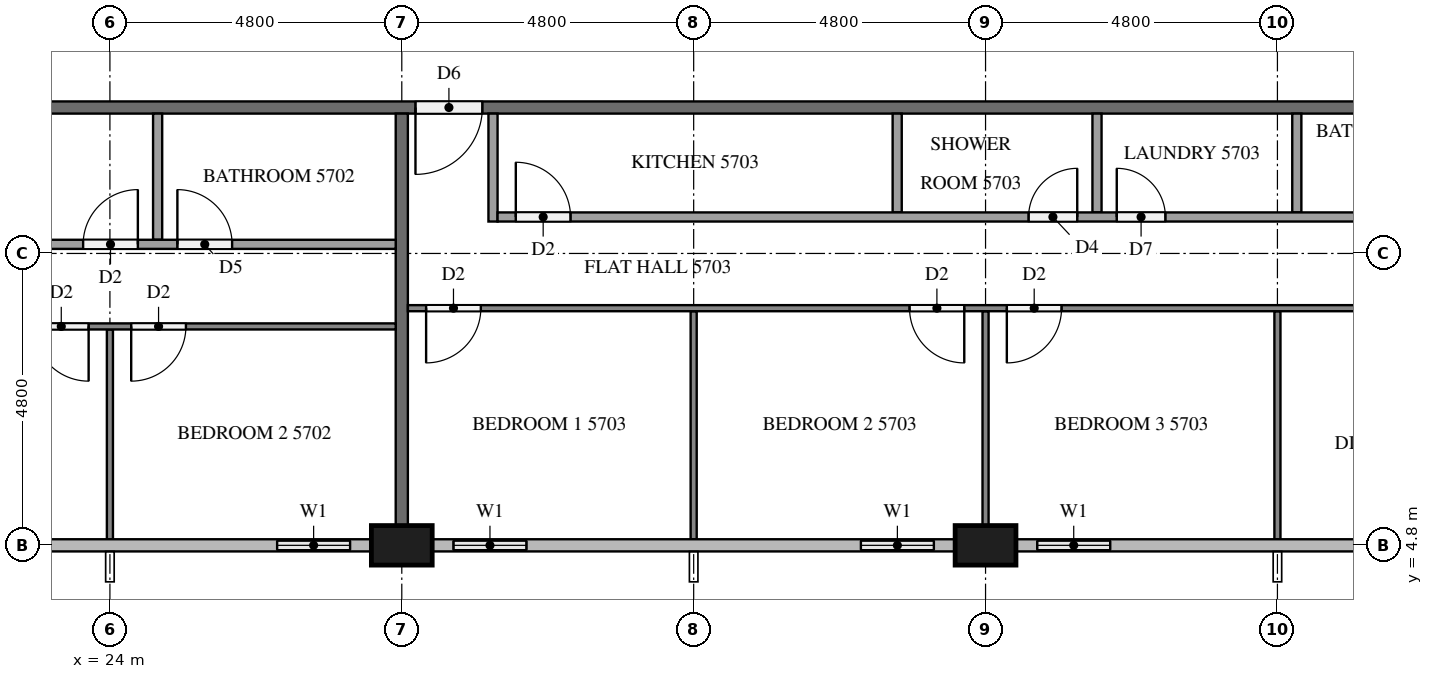
"""IFC4 building model, lengths in metres.
Left out: names, types, materials, properties, quantities, classifications, styles, units other than length and angle.
Written with IfcOpenShell. Run it as: python <this file> out.ifc"""

import sys

from ifc_helpers import new_model, si_unit, direction, frame, frame_2d, origin, origin_2d, place, context, subcontext, project, spatial, rectangle, extrude, element, fill, save


model = new_model("IFC4")
c1 = context("Model", 3, precision=1e-05, world=origin(), true_north=direction((0.0, 1.0)))
c2 = subcontext(c1, "Body", "Model", "MODEL_VIEW")
j1 = project(units=[si_unit("LENGTHUNIT", "METRE"), si_unit("PLANEANGLEUNIT", "RADIAN")], contexts=[c1])
p1 = place(None, origin())
s1 = spatial("IfcSite", under=j1, at=p1, CompositionType="ELEMENT")
p2 = place(p1, origin())
s2 = spatial("IfcBuilding", under=s1, at=p2, CompositionType="ELEMENT")
p3 = place(p2, frame((0.0, 0.0, 219.3)))
s3 = spatial("IfcBuildingStorey", under=s2, at=p3, CompositionType="ELEMENT", Elevation=219.3)
for number, where, z_axis, x_axis in (
    (1, (28.8, 4.8, 0.0), (0.0, 0.0, 1.0), (1.0, 0.0, 0.0)),
    (2, (38.4, 4.8, 0.0), (0.0, 0.0, 1.0), (1.0, 0.0, 0.0)),
):
    element("IfcColumn", number, at=place(p3, frame(where, z_axis=z_axis, x_axis=x_axis)), inside=s3, PredefinedType="COLUMN", context=c2, shape_type="SweptSolid", body=[
        extrude(rectangle(XDim=1.0, YDim=0.65, at=origin_2d()), origin(), (0.0, 0.0, 1.0), 3.2),
    ])
p4 = place(p3, frame((26.4, 4.8, 0.0), z_axis=(0.0, 0.0, 1.0), x_axis=(1.0, 0.0, 0.0)))
e3 = element("IfcWall", 3, at=p4, inside=s3, PredefinedType="SOLIDWALL", context=c2, shape_type="SweptSolid", body=[
    extrude(rectangle(XDim=1.9, YDim=0.15, at=frame_2d((0.95, 0.0))), origin(), (0.0, 0.0, 1.0), 3.2),
])
p5 = place(p4, frame((0.35, 0.0, 0.9)))
e4 = element("IfcOpeningElement", 4, at=p5, cuts=e3, PredefinedType="OPENING", context=c2, shape_type="SweptSolid", body=[
    extrude(rectangle(XDim=1.2, YDim=1.4, at=frame_2d((0.6, 0.7))), frame((0.0, 0.085, 0.0), z_axis=(0.0, -1.0, 0.0), x_axis=(1.0, 0.0, 0.0)), (0.0, 0.0, 1.0), 0.17),
])
p6 = place(p3, frame((29.3, 4.8, 0.0), z_axis=(0.0, 0.0, 1.0), x_axis=(1.0, 0.0, 0.0)))
e5 = element("IfcWall", 5, at=p6, inside=s3, PredefinedType="SOLIDWALL", context=c2, shape_type="SweptSolid", body=[
    extrude(rectangle(XDim=1.9, YDim=0.15, at=frame_2d((0.95, 0.0))), origin(), (0.0, 0.0, 1.0), 3.2),
])
p7 = place(p6, frame((0.35, 0.0, 0.9)))
e6 = element("IfcOpeningElement", 6, at=p7, cuts=e5, PredefinedType="OPENING", context=c2, shape_type="SweptSolid", body=[
    extrude(rectangle(XDim=1.2, YDim=1.4, at=frame_2d((0.6, 0.7))), frame((0.0, 0.085, 0.0), z_axis=(0.0, -1.0, 0.0), x_axis=(1.0, 0.0, 0.0)), (0.0, 0.0, 1.0), 0.17),
])
p8 = place(p3, frame((36.0, 4.8, 0.0), z_axis=(0.0, 0.0, 1.0), x_axis=(1.0, 0.0, 0.0)))
e7 = element("IfcWall", 7, at=p8, inside=s3, PredefinedType="SOLIDWALL", context=c2, shape_type="SweptSolid", body=[
    extrude(rectangle(XDim=1.9, YDim=0.15, at=frame_2d((0.95, 0.0))), origin(), (0.0, 0.0, 1.0), 3.2),
])
p9 = place(p8, frame((0.35, 0.0, 0.9)))
e8 = element("IfcOpeningElement", 8, at=p9, cuts=e7, PredefinedType="OPENING", context=c2, shape_type="SweptSolid", body=[
    extrude(rectangle(XDim=1.2, YDim=1.4, at=frame_2d((0.6, 0.7))), frame((0.0, 0.085, 0.0), z_axis=(0.0, -1.0, 0.0), x_axis=(1.0, 0.0, 0.0)), (0.0, 0.0, 1.0), 0.17),
])
p10 = place(p3, frame((38.9, 4.8, 0.0), z_axis=(0.0, 0.0, 1.0), x_axis=(1.0, 0.0, 0.0)))
e9 = element("IfcWall", 9, at=p10, inside=s3, PredefinedType="SOLIDWALL", context=c2, shape_type="SweptSolid", body=[
    extrude(rectangle(XDim=1.9, YDim=0.15, at=frame_2d((0.95, 0.0))), origin(), (0.0, 0.0, 1.0), 3.2),
])
p11 = place(p10, frame((0.35, 0.0, 0.9)))
e10 = element("IfcOpeningElement", 10, at=p11, cuts=e9, PredefinedType="OPENING", context=c2, shape_type="SweptSolid", body=[
    extrude(rectangle(XDim=1.2, YDim=1.4, at=frame_2d((0.6, 0.7))), frame((0.0, 0.085, 0.0), z_axis=(0.0, -1.0, 0.0), x_axis=(1.0, 0.0, 0.0)), (0.0, 0.0, 1.0), 0.17),
])
p12 = place(p3, frame((50.5, 12.0, 0.0), z_axis=(0.0, 0.0, 1.0), x_axis=(-1.0, 0.0, 0.0)))
e11 = element("IfcWall", 11, at=p12, inside=s3, PredefinedType="PARTITIONING", context=c2, shape_type="SweptSolid", body=[
    extrude(rectangle(XDim=38.6, YDim=0.2, at=frame_2d((19.3, 0.0))), origin(), (0.0, 0.0, 1.0), 3.2),
])
p13 = place(p12, frame((36.375, 0.0, 0.0)))
e12 = element("IfcOpeningElement", 12, at=p13, cuts=e11, PredefinedType="OPENING", context=c2, shape_type="SweptSolid", body=[
    extrude(rectangle(XDim=1.0, YDim=2.1, at=frame_2d((0.5, 1.05))), frame((0.0, 0.11, 0.0), z_axis=(0.0, -1.0, 0.0), x_axis=(1.0, 0.0, 0.0)), (0.0, 0.0, 1.0), 0.22),
])
p14 = place(p12, frame((34.825, 0.0, 0.0)))
e13 = element("IfcOpeningElement", 13, at=p14, cuts=e11, PredefinedType="OPENING", context=c2, shape_type="SweptSolid", body=[
    extrude(rectangle(XDim=1.0, YDim=2.1, at=frame_2d((0.5, 1.05))), frame((0.0, 0.11, 0.0), z_axis=(0.0, -1.0, 0.0), x_axis=(1.0, 0.0, 0.0)), (0.0, 0.0, 1.0), 0.22),
])
p15 = place(p12, frame((20.375, 0.0, 0.0)))
e14 = element("IfcOpeningElement", 14, at=p15, cuts=e11, PredefinedType="OPENING", context=c2, shape_type="SweptSolid", body=[
    extrude(rectangle(XDim=1.1, YDim=2.1, at=frame_2d((0.55, 1.05))), frame((0.0, 0.11, 0.0), z_axis=(0.0, -1.0, 0.0), x_axis=(1.0, 0.0, 0.0)), (0.0, 0.0, 1.0), 0.22),
])
p16 = place(p12, frame((1.225, 0.0, 0.0)))
e15 = element("IfcOpeningElement", 15, at=p16, cuts=e11, PredefinedType="OPENING", context=c2, shape_type="SweptSolid", body=[
    extrude(rectangle(XDim=1.0, YDim=2.1, at=frame_2d((0.5, 1.05))), frame((0.0, 0.11, 0.0), z_axis=(0.0, -1.0, 0.0), x_axis=(1.0, 0.0, 0.0)), (0.0, 0.0, 1.0), 0.22),
])
p17 = place(p3, frame((28.8, 11.9, 0.0), z_axis=(0.0, 0.0, 1.0), x_axis=(0.0, -1.0, 0.0)))
e16 = element("IfcWall", 16, at=p17, inside=s3, PredefinedType="PARTITIONING", context=c2, shape_type="SweptSolid", body=[
    extrude(rectangle(XDim=6.775, YDim=0.2, at=frame_2d((3.387, 0.0))), origin(), (0.0, 0.0, 1.0), 3.2),
])
p18 = place(p3, frame((24.0, 8.35, 0.0), z_axis=(0.0, 0.0, 1.0), x_axis=(0.0, -1.0, 0.0)))
e17 = element("IfcWall", 17, at=p18, inside=s3, PredefinedType="PARTITIONING", context=c2, shape_type="SweptSolid", body=[
    extrude(rectangle(XDim=3.45, YDim=0.1, at=frame_2d((1.725, 0.0))), origin(), (0.0, 0.0, 1.0), 3.2),
])
p19 = place(p3, frame((28.7, 8.4, 0.0), z_axis=(0.0, 0.0, 1.0), x_axis=(-1.0, 0.0, 0.0)))
e18 = element("IfcWall", 18, at=p19, inside=s3, PredefinedType="PARTITIONING", context=c2, shape_type="SweptSolid", body=[
    extrude(rectangle(XDim=14.2, YDim=0.1, at=frame_2d((7.1, 0.0))), origin(), (0.0, 0.0, 1.0), 3.2),
])
p20 = place(p19, frame((12.9, 0.0, 0.0)))
e19 = element("IfcOpeningElement", 19, at=p20, cuts=e18, PredefinedType="OPENING", context=c2, shape_type="SweptSolid", body=[
    extrude(rectangle(XDim=1.0, YDim=2.1, at=frame_2d((0.5, 1.05))), frame((0.0, 0.06, 0.0), z_axis=(0.0, -1.0, 0.0), x_axis=(1.0, 0.0, 0.0)), (0.0, 0.0, 1.0), 0.12),
])
p21 = place(p19, frame((5.05, 0.0, 0.0)))
e20 = element("IfcOpeningElement", 20, at=p21, cuts=e18, PredefinedType="OPENING", context=c2, shape_type="SweptSolid", body=[
    extrude(rectangle(XDim=0.9, YDim=2.1, at=frame_2d((0.45, 1.05))), frame((0.0, 0.06, 0.0), z_axis=(0.0, -1.0, 0.0), x_axis=(1.0, 0.0, 0.0)), (0.0, 0.0, 1.0), 0.12),
])
p22 = place(p19, frame((3.45, 0.0, 0.0)))
e21 = element("IfcOpeningElement", 21, at=p22, cuts=e18, PredefinedType="OPENING", context=c2, shape_type="SweptSolid", body=[
    extrude(rectangle(XDim=0.9, YDim=2.1, at=frame_2d((0.45, 1.05))), frame((0.0, 0.06, 0.0), z_axis=(0.0, -1.0, 0.0), x_axis=(1.0, 0.0, 0.0)), (0.0, 0.0, 1.0), 0.12),
])
p23 = place(p3, frame((24.785, 11.9, 0.0), z_axis=(0.0, 0.0, 1.0), x_axis=(0.0, -1.0, 0.0)))
e22 = element("IfcWall", 22, at=p23, inside=s3, PredefinedType="PARTITIONING", context=c2, shape_type="SweptSolid", body=[
    extrude(rectangle(XDim=2.075, YDim=0.15, at=frame_2d((1.038, 0.0))), origin(), (0.0, 0.0, 1.0), 3.2),
])
p24 = place(p3, frame((15.975, 9.75, 0.0), z_axis=(0.0, 0.0, 1.0), x_axis=(1.0, 0.0, 0.0)))
e23 = element("IfcWall", 23, at=p24, inside=s3, PredefinedType="PARTITIONING", context=c2, shape_type="SweptSolid", body=[
    extrude(rectangle(XDim=12.725, YDim=0.15, at=frame_2d((6.362, 0.0))), origin(), (0.0, 0.0, 1.0), 3.2),
])
p25 = place(p24, frame((0.3, 0.0, 0.0)))
e24 = element("IfcOpeningElement", 24, at=p25, cuts=e23, PredefinedType="OPENING", context=c2, shape_type="SweptSolid", body=[
    extrude(rectangle(XDim=0.8, YDim=2.1, at=frame_2d((0.4, 1.05))), frame((0.0, 0.085, 0.0), z_axis=(0.0, -1.0, 0.0), x_axis=(1.0, 0.0, 0.0)), (0.0, 0.0, 1.0), 0.17),
])
p26 = place(p24, frame((7.585, 0.0, 0.0)))
e25 = element("IfcOpeningElement", 25, at=p26, cuts=e23, PredefinedType="OPENING", context=c2, shape_type="SweptSolid", body=[
    extrude(rectangle(XDim=0.9, YDim=2.1, at=frame_2d((0.45, 1.05))), frame((0.0, 0.085, 0.0), z_axis=(0.0, -1.0, 0.0), x_axis=(1.0, 0.0, 0.0)), (0.0, 0.0, 1.0), 0.17),
])
p27 = place(p24, frame((9.135, 0.0, 0.0)))
e26 = element("IfcOpeningElement", 26, at=p27, cuts=e23, PredefinedType="OPENING", context=c2, shape_type="SweptSolid", body=[
    extrude(rectangle(XDim=0.9, YDim=2.1, at=frame_2d((0.45, 1.05))), frame((0.0, 0.085, 0.0), z_axis=(0.0, -1.0, 0.0), x_axis=(1.0, 0.0, 0.0)), (0.0, 0.0, 1.0), 0.17),
])
p28 = place(p3, frame((33.6, 8.65, 0.0), z_axis=(0.0, 0.0, 1.0), x_axis=(0.0, -1.0, 0.0)))
e27 = element("IfcWall", 27, at=p28, inside=s3, PredefinedType="PARTITIONING", context=c2, shape_type="SweptSolid", body=[
    extrude(rectangle(XDim=3.75, YDim=0.1, at=frame_2d((1.875, 0.0))), origin(), (0.0, 0.0, 1.0), 3.2),
])
p29 = place(p3, frame((38.4, 8.65, 0.0), z_axis=(0.0, 0.0, 1.0), x_axis=(0.0, -1.0, 0.0)))
e28 = element("IfcWall", 28, at=p29, inside=s3, PredefinedType="PARTITIONING", context=c2, shape_type="SweptSolid", body=[
    extrude(rectangle(XDim=3.525, YDim=0.1, at=frame_2d((1.762, 0.0))), origin(), (0.0, 0.0, 1.0), 3.2),
])
p30 = place(p3, frame((43.2, 8.65, 0.0), z_axis=(0.0, 0.0, 1.0), x_axis=(0.0, -1.0, 0.0)))
e29 = element("IfcWall", 29, at=p30, inside=s3, PredefinedType="PARTITIONING", context=c2, shape_type="SweptSolid", body=[
    extrude(rectangle(XDim=3.75, YDim=0.1, at=frame_2d((1.875, 0.0))), origin(), (0.0, 0.0, 1.0), 3.2),
])
p31 = place(p3, frame((47.9, 8.7, 0.0), z_axis=(0.0, 0.0, 1.0), x_axis=(-1.0, 0.0, 0.0)))
e30 = element("IfcWall", 30, at=p31, inside=s3, PredefinedType="PARTITIONING", context=c2, shape_type="SweptSolid", body=[
    extrude(rectangle(XDim=19.0, YDim=0.1, at=frame_2d((9.5, 0.0))), origin(), (0.0, 0.0, 1.0), 3.2),
])
p32 = place(p31, frame((17.8, 0.0, 0.0)))
e31 = element("IfcOpeningElement", 31, at=p32, cuts=e30, PredefinedType="OPENING", context=c2, shape_type="SweptSolid", body=[
    extrude(rectangle(XDim=0.9, YDim=2.1, at=frame_2d((0.45, 1.05))), frame((0.0, 0.06, 0.0), z_axis=(0.0, -1.0, 0.0), x_axis=(1.0, 0.0, 0.0)), (0.0, 0.0, 1.0), 0.12),
])
p33 = place(p31, frame((9.85, 0.0, 0.0)))
e32 = element("IfcOpeningElement", 32, at=p33, cuts=e30, PredefinedType="OPENING", context=c2, shape_type="SweptSolid", body=[
    extrude(rectangle(XDim=0.9, YDim=2.1, at=frame_2d((0.45, 1.05))), frame((0.0, 0.06, 0.0), z_axis=(0.0, -1.0, 0.0), x_axis=(1.0, 0.0, 0.0)), (0.0, 0.0, 1.0), 0.12),
])
p34 = place(p31, frame((8.25, 0.0, 0.0)))
e33 = element("IfcOpeningElement", 33, at=p34, cuts=e30, PredefinedType="OPENING", context=c2, shape_type="SweptSolid", body=[
    extrude(rectangle(XDim=0.9, YDim=2.1, at=frame_2d((0.45, 1.05))), frame((0.0, 0.06, 0.0), z_axis=(0.0, -1.0, 0.0), x_axis=(1.0, 0.0, 0.0)), (0.0, 0.0, 1.0), 0.12),
])
p35 = place(p31, frame((0.3, 0.0, 0.0)))
e34 = element("IfcOpeningElement", 34, at=p35, cuts=e30, PredefinedType="OPENING", context=c2, shape_type="SweptSolid", body=[
    extrude(rectangle(XDim=1.0, YDim=2.1, at=frame_2d((0.5, 1.05))), frame((0.0, 0.06, 0.0), z_axis=(0.0, -1.0, 0.0), x_axis=(1.0, 0.0, 0.0)), (0.0, 0.0, 1.0), 0.12),
])
for number, where, z_axis, x_axis in (
    (35, (36.947, 11.9, 0.0), (0.0, 0.0, 1.0), (0.0, -1.0, 0.0)),
    (36, (40.233, 11.9, 0.0), (0.0, 0.0, 1.0), (0.0, -1.0, 0.0)),
    (37, (43.519, 11.9, 0.0), (0.0, 0.0, 1.0), (0.0, -1.0, 0.0)),
):
    element("IfcWall", number, at=place(p3, frame(where, z_axis=z_axis, x_axis=x_axis)), inside=s3, PredefinedType="PARTITIONING", context=c2, shape_type="SweptSolid", body=[
        extrude(rectangle(XDim=1.625, YDim=0.15, at=frame_2d((0.812, 0.0))), origin(), (0.0, 0.0, 1.0), 3.2),
    ])
p36 = place(p3, frame((30.3, 11.9, 0.0), z_axis=(0.0, 0.0, 1.0), x_axis=(0.0, -1.0, 0.0)))
e38 = element("IfcWall", 38, at=p36, inside=s3, PredefinedType="PARTITIONING", context=c2, shape_type="SweptSolid", body=[
    extrude(rectangle(XDim=1.775, YDim=0.15, at=frame_2d((0.887, 0.0))), origin(), (0.0, 0.0, 1.0), 3.2),
])
p37 = place(p3, frame((30.375, 10.2, 0.0), z_axis=(0.0, 0.0, 1.0), x_axis=(1.0, 0.0, 0.0)))
e39 = element("IfcWall", 39, at=p37, inside=s3, PredefinedType="PARTITIONING", context=c2, shape_type="SweptSolid", body=[
    extrude(rectangle(XDim=17.525, YDim=0.15, at=frame_2d((8.762, 0.0))), origin(), (0.0, 0.0, 1.0), 3.2),
])
p38 = place(p37, frame((0.3, 0.0, 0.0)))
e40 = element("IfcOpeningElement", 40, at=p38, cuts=e39, PredefinedType="OPENING", context=c2, shape_type="SweptSolid", body=[
    extrude(rectangle(XDim=0.9, YDim=2.1, at=frame_2d((0.45, 1.05))), frame((0.0, 0.085, 0.0), z_axis=(0.0, -1.0, 0.0), x_axis=(1.0, 0.0, 0.0)), (0.0, 0.0, 1.0), 0.17),
])
p39 = place(p37, frame((8.733, 0.0, 0.0)))
e41 = element("IfcOpeningElement", 41, at=p39, cuts=e39, PredefinedType="OPENING", context=c2, shape_type="SweptSolid", body=[
    extrude(rectangle(XDim=0.8, YDim=2.1, at=frame_2d((0.4, 1.05))), frame((0.0, 0.085, 0.0), z_axis=(0.0, -1.0, 0.0), x_axis=(1.0, 0.0, 0.0)), (0.0, 0.0, 1.0), 0.17),
])
p40 = place(p37, frame((10.183, 0.0, 0.0)))
e42 = element("IfcOpeningElement", 42, at=p40, cuts=e39, PredefinedType="OPENING", context=c2, shape_type="SweptSolid", body=[
    extrude(rectangle(XDim=0.8, YDim=2.1, at=frame_2d((0.4, 1.05))), frame((0.0, 0.085, 0.0), z_axis=(0.0, -1.0, 0.0), x_axis=(1.0, 0.0, 0.0)), (0.0, 0.0, 1.0), 0.17),
])
p41 = place(p37, frame((16.275, 0.0, 0.0)))
e43 = element("IfcOpeningElement", 43, at=p41, cuts=e39, PredefinedType="OPENING", context=c2, shape_type="SweptSolid", body=[
    extrude(rectangle(XDim=0.9, YDim=2.1, at=frame_2d((0.45, 1.05))), frame((0.0, 0.085, 0.0), z_axis=(0.0, -1.0, 0.0), x_axis=(1.0, 0.0, 0.0)), (0.0, 0.0, 1.0), 0.17),
])
p42 = place(p5, origin())
e44 = element("IfcWindow", 44, at=p42, inside=s3, PartitioningType="SINGLE_PANEL", PredefinedType="WINDOW", context=c2, shape_type="SweptSolid", body=[
    extrude(rectangle(XDim=1.2, YDim=1.4, at=frame_2d((0.6, 0.7))), frame((0.0, 0.03, 0.0), z_axis=(0.0, -1.0, 0.0), x_axis=(1.0, 0.0, 0.0)), (0.0, 0.0, 1.0), 0.06),
])
fill(e4, e44)
p43 = place(p7, origin())
e45 = element("IfcWindow", 45, at=p43, inside=s3, PartitioningType="SINGLE_PANEL", PredefinedType="WINDOW", context=c2, shape_type="SweptSolid", body=[
    extrude(rectangle(XDim=1.2, YDim=1.4, at=frame_2d((0.6, 0.7))), frame((0.0, 0.03, 0.0), z_axis=(0.0, -1.0, 0.0), x_axis=(1.0, 0.0, 0.0)), (0.0, 0.0, 1.0), 0.06),
])
fill(e6, e45)
p44 = place(p9, origin())
e46 = element("IfcWindow", 46, at=p44, inside=s3, PartitioningType="SINGLE_PANEL", PredefinedType="WINDOW", context=c2, shape_type="SweptSolid", body=[
    extrude(rectangle(XDim=1.2, YDim=1.4, at=frame_2d((0.6, 0.7))), frame((0.0, 0.03, 0.0), z_axis=(0.0, -1.0, 0.0), x_axis=(1.0, 0.0, 0.0)), (0.0, 0.0, 1.0), 0.06),
])
fill(e8, e46)
p45 = place(p11, origin())
e47 = element("IfcWindow", 47, at=p45, inside=s3, PartitioningType="SINGLE_PANEL", PredefinedType="WINDOW", context=c2, shape_type="SweptSolid", body=[
    extrude(rectangle(XDim=1.2, YDim=1.4, at=frame_2d((0.6, 0.7))), frame((0.0, 0.03, 0.0), z_axis=(0.0, -1.0, 0.0), x_axis=(1.0, 0.0, 0.0)), (0.0, 0.0, 1.0), 0.06),
])
fill(e10, e47)
p46 = place(p15, origin())
e48 = element("IfcDoor", 48, at=p46, inside=s3, OperationType="SINGLE_SWING_RIGHT", PredefinedType="DOOR", context=c2, shape_type="SweptSolid", body=[
    extrude(rectangle(XDim=1.1, YDim=2.1, at=frame_2d((0.55, 1.05))), frame((0.0, 0.025, 0.0), z_axis=(0.0, -1.0, 0.0), x_axis=(1.0, 0.0, 0.0)), (0.0, 0.0, 1.0), 0.05),
])
fill(e14, e48)
p47 = place(p21, origin())
e49 = element("IfcDoor", 49, at=p47, inside=s3, OperationType="SINGLE_SWING_LEFT", PredefinedType="DOOR", context=c2, shape_type="SweptSolid", body=[
    extrude(rectangle(XDim=0.9, YDim=2.1, at=frame_2d((0.45, 1.05))), frame((0.0, 0.025, 0.0), z_axis=(0.0, -1.0, 0.0), x_axis=(1.0, 0.0, 0.0)), (0.0, 0.0, 1.0), 0.05),
])
fill(e20, e49)
p48 = place(p22, origin())
e50 = element("IfcDoor", 50, at=p48, inside=s3, OperationType="SINGLE_SWING_RIGHT", PredefinedType="DOOR", context=c2, shape_type="SweptSolid", body=[
    extrude(rectangle(XDim=0.9, YDim=2.1, at=frame_2d((0.45, 1.05))), frame((0.0, 0.025, 0.0), z_axis=(0.0, -1.0, 0.0), x_axis=(1.0, 0.0, 0.0)), (0.0, 0.0, 1.0), 0.05),
])
fill(e21, e50)
p49 = place(p26, origin())
e51 = element("IfcDoor", 51, at=p49, inside=s3, OperationType="SINGLE_SWING_RIGHT", PredefinedType="DOOR", context=c2, shape_type="SweptSolid", body=[
    extrude(rectangle(XDim=0.9, YDim=2.1, at=frame_2d((0.45, 1.05))), frame((0.0, 0.025, 0.0), z_axis=(0.0, -1.0, 0.0), x_axis=(1.0, 0.0, 0.0)), (0.0, 0.0, 1.0), 0.05),
])
fill(e25, e51)
p50 = place(p27, origin())
e52 = element("IfcDoor", 52, at=p50, inside=s3, OperationType="SINGLE_SWING_LEFT", PredefinedType="DOOR", context=c2, shape_type="SweptSolid", body=[
    extrude(rectangle(XDim=0.9, YDim=2.1, at=frame_2d((0.45, 1.05))), frame((0.0, 0.025, 0.0), z_axis=(0.0, -1.0, 0.0), x_axis=(1.0, 0.0, 0.0)), (0.0, 0.0, 1.0), 0.05),
])
fill(e26, e52)
p51 = place(p32, origin())
e53 = element("IfcDoor", 53, at=p51, inside=s3, OperationType="SINGLE_SWING_RIGHT", PredefinedType="DOOR", context=c2, shape_type="SweptSolid", body=[
    extrude(rectangle(XDim=0.9, YDim=2.1, at=frame_2d((0.45, 1.05))), frame((0.0, 0.025, 0.0), z_axis=(0.0, -1.0, 0.0), x_axis=(1.0, 0.0, 0.0)), (0.0, 0.0, 1.0), 0.05),
])
fill(e31, e53)
p52 = place(p33, origin())
e54 = element("IfcDoor", 54, at=p52, inside=s3, OperationType="SINGLE_SWING_LEFT", PredefinedType="DOOR", context=c2, shape_type="SweptSolid", body=[
    extrude(rectangle(XDim=0.9, YDim=2.1, at=frame_2d((0.45, 1.05))), frame((0.0, 0.025, 0.0), z_axis=(0.0, -1.0, 0.0), x_axis=(1.0, 0.0, 0.0)), (0.0, 0.0, 1.0), 0.05),
])
fill(e32, e54)
p53 = place(p34, origin())
e55 = element("IfcDoor", 55, at=p53, inside=s3, OperationType="SINGLE_SWING_RIGHT", PredefinedType="DOOR", context=c2, shape_type="SweptSolid", body=[
    extrude(rectangle(XDim=0.9, YDim=2.1, at=frame_2d((0.45, 1.05))), frame((0.0, 0.025, 0.0), z_axis=(0.0, -1.0, 0.0), x_axis=(1.0, 0.0, 0.0)), (0.0, 0.0, 1.0), 0.05),
])
fill(e33, e55)
p54 = place(p38, origin())
e56 = element("IfcDoor", 56, at=p54, inside=s3, OperationType="SINGLE_SWING_LEFT", PredefinedType="DOOR", context=c2, shape_type="SweptSolid", body=[
    extrude(rectangle(XDim=0.9, YDim=2.1, at=frame_2d((0.45, 1.05))), frame((0.0, 0.025, 0.0), z_axis=(0.0, -1.0, 0.0), x_axis=(1.0, 0.0, 0.0)), (0.0, 0.0, 1.0), 0.05),
])
fill(e40, e56)
p55 = place(p39, origin())
e57 = element("IfcDoor", 57, at=p55, inside=s3, OperationType="SINGLE_SWING_RIGHT", PredefinedType="DOOR", context=c2, shape_type="SweptSolid", body=[
    extrude(rectangle(XDim=0.8, YDim=2.1, at=frame_2d((0.4, 1.05))), frame((0.0, 0.025, 0.0), z_axis=(0.0, -1.0, 0.0), x_axis=(1.0, 0.0, 0.0)), (0.0, 0.0, 1.0), 0.05),
])
fill(e41, e57)
p56 = place(p40, origin())
e58 = element("IfcDoor", 58, at=p56, inside=s3, OperationType="SINGLE_SWING_LEFT", PredefinedType="DOOR", context=c2, shape_type="SweptSolid", body=[
    extrude(rectangle(XDim=0.8, YDim=2.1, at=frame_2d((0.4, 1.05))), frame((0.0, 0.025, 0.0), z_axis=(0.0, -1.0, 0.0), x_axis=(1.0, 0.0, 0.0)), (0.0, 0.0, 1.0), 0.05),
])
fill(e42, e58)
save(model, sys.argv[1])
